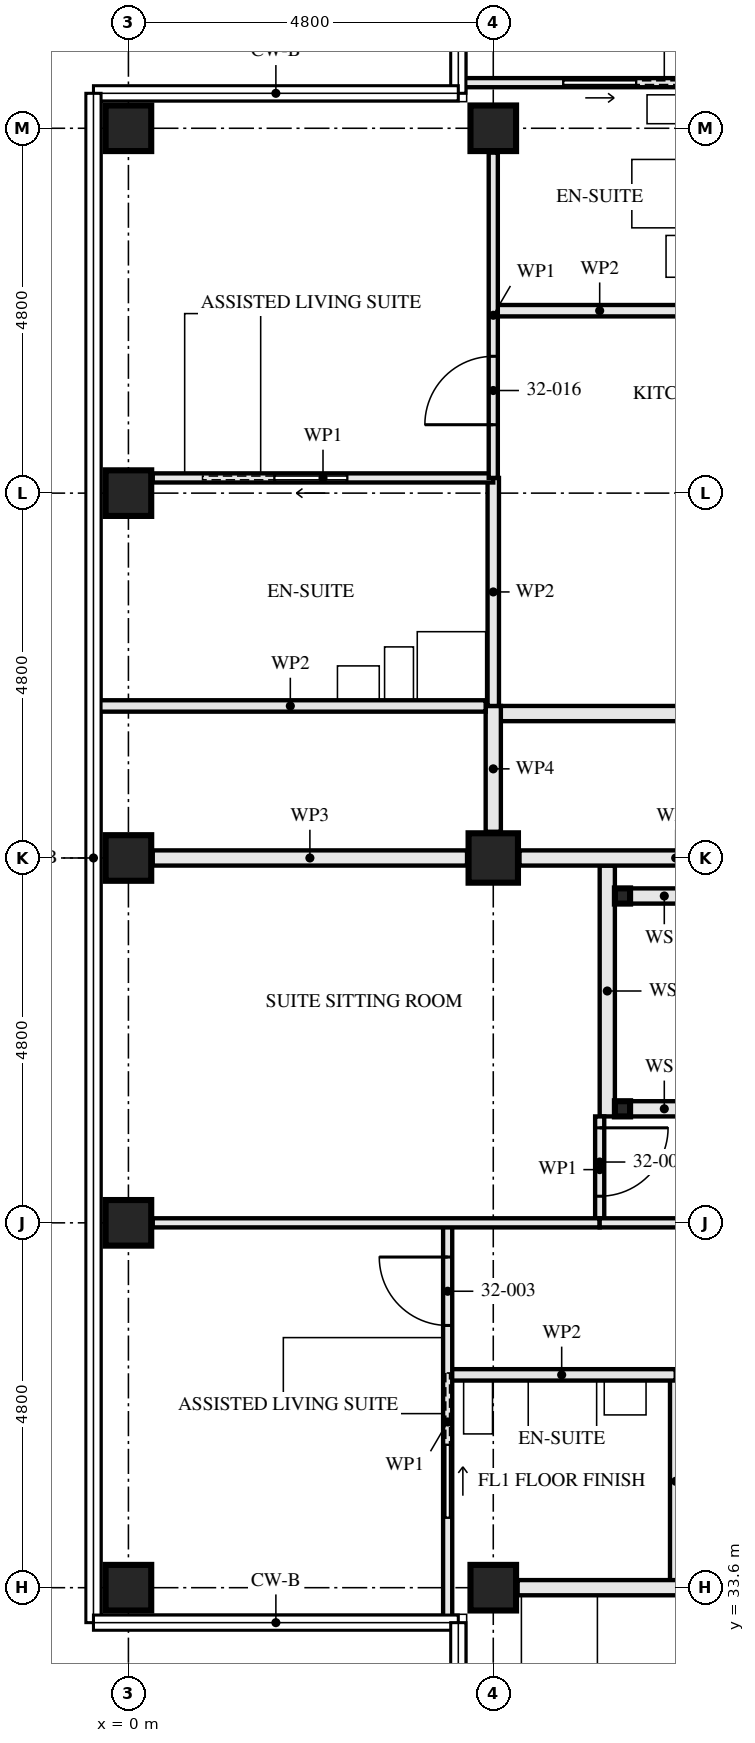
"""IFC4 building model, lengths in metres.
Left out: names, types, materials, properties, quantities, classifications, styles, units other than length and angle.
Written with IfcOpenShell. Run it as: python <this file> out.ifc"""

import sys

from ifc_helpers import new_model, si_unit, direction, frame, frame_2d, origin, origin_2d, place, context, subcontext, project, spatial, rectangle, hollow_rectangle, extrude, element, fill, save


model = new_model("IFC4")
c1 = context("Model", 3, precision=1e-05, world=origin(), true_north=direction((0.0, 1.0)))
c2 = subcontext(c1, "Body", "Model", "MODEL_VIEW")
j1 = project(units=[si_unit("LENGTHUNIT", "METRE"), si_unit("PLANEANGLEUNIT", "RADIAN")], contexts=[c1])
p1 = place(None, origin())
s1 = spatial("IfcSite", under=j1, at=p1, CompositionType="ELEMENT")
p2 = place(p1, origin())
s2 = spatial("IfcBuilding", under=s1, at=p2, CompositionType="ELEMENT")
p3 = place(p2, frame((0.0, 0.0, 119.0)))
s3 = spatial("IfcBuildingStorey", under=s2, at=p3, CompositionType="ELEMENT", Elevation=119.0)
for number, where, z_axis, x_axis in (
    (1, (0.0, 33.6, 0.0), (0.0, 0.0, 1.0), (0.0, 1.0, 0.0)),
    (2, (0.0, 38.4, 0.0), (0.0, 0.0, 1.0), (1.0, 0.0, 0.0)),
    (3, (0.0, 43.2, 0.0), (0.0, 0.0, 1.0), (0.0, 1.0, 0.0)),
    (4, (0.0, 48.0, 0.0), (0.0, 0.0, 1.0), (1.0, 0.0, 0.0)),
    (5, (0.0, 52.8, 0.0), (0.0, 0.0, 1.0), (0.0, 1.0, 0.0)),
    (6, (4.8, 33.6, 0.0), (0.0, 0.0, 1.0), (0.0, 1.0, 0.0)),
):
    element("IfcColumn", number, at=place(p3, frame(where, z_axis=z_axis, x_axis=x_axis)), inside=s3, PredefinedType="COLUMN", context=c2, shape_type="SweptSolid", body=[
        extrude(hollow_rectangle(XDim=0.6, YDim=0.6, WallThickness=0.08, at=origin_2d()), origin(), (0.0, 0.0, 1.0), 3.5),
    ])
p4 = place(p3, frame((4.8, 43.2, 0.0), z_axis=(0.0, 0.0, 1.0), x_axis=(0.0, 1.0, 0.0)))
e7 = element("IfcColumn", 7, at=p4, inside=s3, PredefinedType="COLUMN", context=c2, shape_type="SweptSolid", body=[
    extrude(hollow_rectangle(XDim=0.65, YDim=0.65, WallThickness=0.05, at=origin_2d()), origin(), (0.0, 0.0, 1.0), 3.5),
])
p5 = place(p3, frame((4.8, 52.8, 0.0), z_axis=(0.0, 0.0, 1.0), x_axis=(0.0, 1.0, 0.0)))
e8 = element("IfcColumn", 8, at=p5, inside=s3, PredefinedType="COLUMN", context=c2, shape_type="SweptSolid", body=[
    extrude(hollow_rectangle(XDim=0.6, YDim=0.6, WallThickness=0.08, at=origin_2d()), origin(), (0.0, 0.0, 1.0), 3.5),
])
for number, where, z_axis, x_axis in (
    (9, (6.5, 42.7, 0.0), (0.0, 0.0, 1.0), (1.0, 0.0, 0.0)),
    (10, (6.5, 39.9, 0.0), (0.0, 0.0, 1.0), (1.0, 0.0, 0.0)),
):
    element("IfcColumn", number, at=place(p3, frame(where, z_axis=z_axis, x_axis=x_axis)), inside=s3, PredefinedType="COLUMN", context=c2, shape_type="SweptSolid", body=[
        extrude(hollow_rectangle(XDim=0.2, YDim=0.2, WallThickness=0.008, at=origin_2d()), origin(), (0.0, 0.0, 1.0), 3.33),
    ])
for number, where, z_axis, x_axis in (
    (11, (6.6, 42.7, 0.0), (0.0, 0.0, 1.0), (1.0, 0.0, 0.0)),
    (12, (6.6, 39.9, 0.0), (0.0, 0.0, 1.0), (1.0, 0.0, 0.0)),
):
    element("IfcWall", number, at=place(p3, frame(where, z_axis=z_axis, x_axis=x_axis)), inside=s3, PredefinedType="SOLIDWALL", context=c2, shape_type="SweptSolid", body=[
        extrude(rectangle(XDim=0.9, YDim=0.2, at=frame_2d((0.45, 0.0))), origin(), (0.0, 0.0, 1.0), 2.99),
    ])
p6 = place(p3, frame((6.3, 43.1, 0.0), z_axis=(0.0, 0.0, 1.0), x_axis=(0.0, -1.0, 0.0)))
e13 = element("IfcWall", 13, at=p6, inside=s3, PredefinedType="SOLIDWALL", context=c2, shape_type="SweptSolid", body=[
    extrude(rectangle(XDim=3.3, YDim=0.2, at=frame_2d((1.65, 0.0))), origin(), (0.0, 0.0, 1.0), 3.33),
])
p7 = place(p3, frame((4.2, 36.4, 0.0), z_axis=(0.0, 0.0, 1.0), x_axis=(1.0, 0.0, 0.0)))
e14 = element("IfcWall", 14, at=p7, inside=s3, PredefinedType="PARTITIONING", context=c2, shape_type="SweptSolid", body=[
    extrude(rectangle(XDim=3.0, YDim=0.15, at=frame_2d((1.5, 0.0))), origin(), (0.0, 0.0, 1.0), 3.33),
])
p8 = place(p3, frame((7.2, 36.4, 0.0), z_axis=(0.0, 0.0, 1.0), x_axis=(0.0, -1.0, 0.0)))
e15 = element("IfcWall", 15, at=p8, inside=s3, PredefinedType="PARTITIONING", context=c2, shape_type="SweptSolid", body=[
    extrude(rectangle(XDim=2.8, YDim=0.15, at=frame_2d((1.4, 0.0))), origin(), (0.0, 0.0, 1.0), 3.33),
])
p9 = place(p3, frame((6.2, 38.4, 0.0), z_axis=(0.0, 0.0, 1.0), x_axis=(1.0, 0.0, 0.0)))
e16 = element("IfcWall", 16, at=p9, inside=s3, PredefinedType="PARTITIONING", context=c2, shape_type="SweptSolid", body=[
    extrude(rectangle(XDim=6.25, YDim=0.12, at=frame_2d((3.125, 0.0))), origin(), (0.0, 0.0, 1.0), 2.55),
])
p10 = place(p9, frame((2.675, 0.0, 0.0)))
e17 = element("IfcOpeningElement", 17, at=p10, cuts=e16, PredefinedType="OPENING", context=c2, shape_type="SweptSolid", body=[
    extrude(rectangle(XDim=0.9, YDim=2.1, at=frame_2d((0.45, 1.05))), frame((0.0, 0.071, 0.0), z_axis=(0.0, -1.0, 0.0), x_axis=(1.0, 0.0, 0.0)), (0.0, 0.0, 1.0), 0.141),
])
p11 = place(p3, frame((6.2, 39.8, 0.0), z_axis=(0.0, 0.0, 1.0), x_axis=(0.0, -1.0, 0.0)))
e18 = element("IfcWall", 18, at=p11, inside=s3, PredefinedType="PARTITIONING", context=c2, shape_type="SweptSolid", body=[
    extrude(rectangle(XDim=1.4, YDim=0.12, at=frame_2d((0.7, 0.0))), origin(), (0.0, 0.0, 1.0), 3.33),
])
p12 = place(p11, frame((0.15, 0.0, 0.0)))
e19 = element("IfcOpeningElement", 19, at=p12, cuts=e18, PredefinedType="OPENING", context=c2, shape_type="SweptSolid", body=[
    extrude(rectangle(XDim=0.9, YDim=2.1, at=frame_2d((0.45, 1.05))), frame((0.0, 0.071, 0.0), z_axis=(0.0, -1.0, 0.0), x_axis=(1.0, 0.0, 0.0)), (0.0, 0.0, 1.0), 0.141),
])
p13 = place(p3, frame((4.2, 38.4, 0.0), z_axis=(0.0, 0.0, 1.0), x_axis=(0.0, -1.0, 0.0)))
e20 = element("IfcWall", 20, at=p13, inside=s3, PredefinedType="PARTITIONING", context=c2, shape_type="SweptSolid", body=[
    extrude(rectangle(XDim=5.24, YDim=0.12, at=frame_2d((2.62, 0.0))), origin(), (0.0, 0.0, 1.0), 2.32),
])
p14 = place(p13, frame((0.45, 0.0, 0.0)))
e21 = element("IfcOpeningElement", 21, at=p14, cuts=e20, PredefinedType="OPENING", context=c2, shape_type="SweptSolid", body=[
    extrude(rectangle(XDim=0.9, YDim=2.1, at=frame_2d((0.45, 1.05))), frame((0.0, 0.071, 0.0), z_axis=(0.0, -1.0, 0.0), x_axis=(1.0, 0.0, 0.0)), (0.0, 0.0, 1.0), 0.141),
])
p15 = place(p13, frame((2.925, 0.0, 0.0)))
e22 = element("IfcOpeningElement", 22, at=p15, cuts=e20, PredefinedType="OPENING", context=c2, shape_type="SweptSolid", body=[
    extrude(rectangle(XDim=0.95, YDim=2.1, at=frame_2d((0.475, 1.05))), frame((0.0, 0.071, 0.0), z_axis=(0.0, -1.0, 0.0), x_axis=(1.0, 0.0, 0.0)), (0.0, 0.0, 1.0), 0.141),
])
p16 = place(p3, frame((0.32, 38.4, 0.0), z_axis=(0.0, 0.0, 1.0), x_axis=(1.0, 0.0, 0.0)))
e23 = element("IfcWall", 23, at=p16, inside=s3, PredefinedType="PARTITIONING", context=c2, shape_type="SweptSolid", body=[
    extrude(rectangle(XDim=5.88, YDim=0.12, at=frame_2d((2.94, 0.0))), origin(), (0.0, 0.0, 1.0), 2.55),
])
p17 = place(p3, frame((5.12, 33.6, 0.0), z_axis=(0.0, 0.0, 1.0), x_axis=(1.0, 0.0, 0.0)))
e24 = element("IfcWall", 24, at=p17, inside=s3, PredefinedType="PARTITIONING", context=c2, shape_type="SweptSolid", body=[
    extrude(rectangle(XDim=7.28, YDim=0.2, at=frame_2d((3.64, 0.0))), origin(), (0.0, 0.0, 1.0), 2.55),
])
p18 = place(p3, frame((7.6, 50.4, 0.0), z_axis=(0.0, 0.0, 1.0), x_axis=(-1.0, 0.0, 0.0)))
e25 = element("IfcWall", 25, at=p18, inside=s3, PredefinedType="PARTITIONING", context=c2, shape_type="SweptSolid", body=[
    extrude(rectangle(XDim=2.8, YDim=0.15, at=frame_2d((1.4, 0.0))), origin(), (0.0, 0.0, 1.0), 3.33),
])
p19 = place(p3, frame((4.8, 48.2, 0.0), z_axis=(0.0, 0.0, 1.0), x_axis=(0.0, -1.0, 0.0)))
e26 = element("IfcWall", 26, at=p19, inside=s3, PredefinedType="PARTITIONING", context=c2, shape_type="SweptSolid", body=[
    extrude(rectangle(XDim=3.0, YDim=0.15, at=frame_2d((1.5, 0.0))), origin(), (0.0, 0.0, 1.0), 2.55),
])
p20 = place(p3, frame((9.6, 53.4, 0.0), z_axis=(0.0, 0.0, 1.0), x_axis=(-1.0, 0.0, 0.0)))
e27 = element("IfcWall", 27, at=p20, inside=s3, PredefinedType="PARTITIONING", context=c2, shape_type="SweptSolid", body=[
    extrude(rectangle(XDim=5.24, YDim=0.12, at=frame_2d((2.62, 0.0))), origin(), (0.0, 0.0, 1.0), 2.32),
])
p21 = place(p20, frame((0.45, 0.0, 0.0)))
e28 = element("IfcOpeningElement", 28, at=p21, cuts=e27, PredefinedType="OPENING", context=c2, shape_type="SweptSolid", body=[
    extrude(rectangle(XDim=0.9, YDim=2.1, at=frame_2d((0.45, 1.05))), frame((0.0, 0.071, 0.0), z_axis=(0.0, -1.0, 0.0), x_axis=(1.0, 0.0, 0.0)), (0.0, 0.0, 1.0), 0.141),
])
p22 = place(p20, frame((2.925, 0.0, 0.0)))
e29 = element("IfcOpeningElement", 29, at=p22, cuts=e27, PredefinedType="OPENING", context=c2, shape_type="SweptSolid", body=[
    extrude(rectangle(XDim=0.95, YDim=2.1, at=frame_2d((0.475, 1.05))), frame((0.0, 0.071, 0.0), z_axis=(0.0, -1.0, 0.0), x_axis=(1.0, 0.0, 0.0)), (0.0, 0.0, 1.0), 0.141),
])
p23 = place(p3, frame((4.8, 48.2, 0.0), z_axis=(0.0, 0.0, 1.0), x_axis=(-1.0, 0.0, 0.0)))
e30 = element("IfcWall", 30, at=p23, inside=s3, PredefinedType="PARTITIONING", context=c2, shape_type="SweptSolid", body=[
    extrude(rectangle(XDim=4.48, YDim=0.12, at=frame_2d((2.24, 0.0))), origin(), (0.0, 0.0, 1.0), 3.33),
])
p24 = place(p23, frame((1.925, 0.0, 0.0)))
e31 = element("IfcOpeningElement", 31, at=p24, cuts=e30, PredefinedType="OPENING", context=c2, shape_type="SweptSolid", body=[
    extrude(rectangle(XDim=0.95, YDim=2.1, at=frame_2d((0.475, 1.05))), frame((0.0, 0.071, 0.0), z_axis=(0.0, -1.0, 0.0), x_axis=(1.0, 0.0, 0.0)), (0.0, 0.0, 1.0), 0.141),
])
p25 = place(p3, frame((4.8, 52.48, 0.0), z_axis=(0.0, 0.0, 1.0), x_axis=(0.0, -1.0, 0.0)))
e32 = element("IfcWall", 32, at=p25, inside=s3, PredefinedType="PARTITIONING", context=c2, shape_type="SweptSolid", body=[
    extrude(rectangle(XDim=4.28, YDim=0.12, at=frame_2d((2.14, 0.0))), origin(), (0.0, 0.0, 1.0), 3.33),
])
p26 = place(p25, frame((2.68, 0.0, 0.0)))
e33 = element("IfcOpeningElement", 33, at=p26, cuts=e32, PredefinedType="OPENING", context=c2, shape_type="SweptSolid", body=[
    extrude(rectangle(XDim=0.9, YDim=2.1, at=frame_2d((0.45, 1.05))), frame((0.0, 0.071, 0.0), z_axis=(0.0, -1.0, 0.0), x_axis=(1.0, 0.0, 0.0)), (0.0, 0.0, 1.0), 0.141),
])
p27 = place(p3, frame((14.4, 45.1, 0.0), z_axis=(0.0, 0.0, 1.0), x_axis=(-1.0, 0.0, 0.0)))
e34 = element("IfcWall", 34, at=p27, inside=s3, PredefinedType="PARTITIONING", context=c2, shape_type="SweptSolid", body=[
    extrude(rectangle(XDim=9.6, YDim=0.2, at=frame_2d((4.8, 0.0))), origin(), (0.0, 0.0, 1.0), 3.33),
])
p28 = place(p27, frame((0.4, 0.0, 0.0)))
e35 = element("IfcOpeningElement", 35, at=p28, cuts=e34, PredefinedType="OPENING", context=c2, shape_type="SweptSolid", body=[
    extrude(rectangle(XDim=1.0, YDim=2.1, at=frame_2d((0.5, 1.05))), frame((0.0, 0.111, 0.0), z_axis=(0.0, -1.0, 0.0), x_axis=(1.0, 0.0, 0.0)), (0.0, 0.0, 1.0), 0.221),
])
p29 = place(p27, frame((5.2, 0.0, 0.0)))
e36 = element("IfcOpeningElement", 36, at=p29, cuts=e34, PredefinedType="OPENING", context=c2, shape_type="SweptSolid", body=[
    extrude(rectangle(XDim=1.0, YDim=2.1, at=frame_2d((0.5, 1.05))), frame((0.0, 0.111, 0.0), z_axis=(0.0, -1.0, 0.0), x_axis=(1.0, 0.0, 0.0)), (0.0, 0.0, 1.0), 0.221),
])
p30 = place(p3, frame((4.8, 45.2, 0.0), z_axis=(0.0, 0.0, 1.0), x_axis=(0.0, -1.0, 0.0)))
e37 = element("IfcWall", 37, at=p30, inside=s3, PredefinedType="PARTITIONING", context=c2, shape_type="SweptSolid", body=[
    extrude(rectangle(XDim=1.655, YDim=0.2, at=frame_2d((0.828, 0.0))), origin(), (0.0, 0.0, 1.0), 3.33),
])
p31 = place(p3, frame((9.255, 43.2, 0.0), z_axis=(0.0, 0.0, 1.0), x_axis=(-1.0, 0.0, 0.0)))
e38 = element("IfcWall", 38, at=p31, inside=s3, PredefinedType="PARTITIONING", context=c2, shape_type="SweptSolid", body=[
    extrude(rectangle(XDim=4.11, YDim=0.2, at=frame_2d((2.055, 0.0))), origin(), (0.0, 0.0, 1.0), 2.32),
])
p32 = place(p3, frame((4.455, 43.2, 0.0), z_axis=(0.0, 0.0, 1.0), x_axis=(-1.0, 0.0, 0.0)))
e39 = element("IfcWall", 39, at=p32, inside=s3, PredefinedType="PARTITIONING", context=c2, shape_type="SweptSolid", body=[
    extrude(rectangle(XDim=4.135, YDim=0.2, at=frame_2d((2.067, 0.0))), origin(), (0.0, 0.0, 1.0), 2.32),
])
p33 = place(p3, frame((4.7, 45.2, 0.0), z_axis=(0.0, 0.0, 1.0), x_axis=(-1.0, 0.0, 0.0)))
e40 = element("IfcWall", 40, at=p33, inside=s3, PredefinedType="PARTITIONING", context=c2, shape_type="SweptSolid", body=[
    extrude(rectangle(XDim=5.14, YDim=0.15, at=frame_2d((2.57, 0.0))), origin(), (0.0, 0.0, 1.0), 2.32),
])
p34 = place(p12, origin())
e41 = element("IfcDoor", 41, at=p34, inside=s3, OperationType="SINGLE_SWING_RIGHT", PredefinedType="DOOR", context=c2, shape_type="SweptSolid", body=[
    extrude(rectangle(XDim=0.9, YDim=2.1, at=frame_2d((0.45, 1.05))), frame((0.0, 0.022, 0.0), z_axis=(0.0, -1.0, 0.0), x_axis=(1.0, 0.0, 0.0)), (0.0, 0.0, 1.0), 0.044),
])
fill(e19, e41)
p35 = place(p14, frame((0.9, 0.0, 0.0), z_axis=(0.0, 0.0, 1.0), x_axis=(-1.0, 0.0, 0.0)))
e42 = element("IfcDoor", 42, at=p35, inside=s3, OperationType="SINGLE_SWING_LEFT", PredefinedType="DOOR", context=c2, shape_type="SweptSolid", body=[
    extrude(rectangle(XDim=0.9, YDim=2.1, at=frame_2d((0.45, 1.05))), frame((0.0, 0.022, 0.0), z_axis=(0.0, -1.0, 0.0), x_axis=(1.0, 0.0, 0.0)), (0.0, 0.0, 1.0), 0.044),
])
fill(e21, e42)
p36 = place(p15, origin())
e43 = element("IfcDoor", 43, at=p36, inside=s3, OperationType="SLIDING_TO_RIGHT", PredefinedType="DOOR", context=c2, shape_type="SweptSolid", body=[
    extrude(rectangle(XDim=0.95, YDim=2.1, at=frame_2d((0.475, 1.05))), frame((0.0, 0.022, 0.0), z_axis=(0.0, -1.0, 0.0), x_axis=(1.0, 0.0, 0.0)), (0.0, 0.0, 1.0), 0.044),
])
fill(e22, e43)
p37 = place(p22, origin())
e44 = element("IfcDoor", 44, at=p37, inside=s3, OperationType="SLIDING_TO_RIGHT", PredefinedType="DOOR", context=c2, shape_type="SweptSolid", body=[
    extrude(rectangle(XDim=0.95, YDim=2.1, at=frame_2d((0.475, 1.05))), frame((0.0, 0.022, 0.0), z_axis=(0.0, -1.0, 0.0), x_axis=(1.0, 0.0, 0.0)), (0.0, 0.0, 1.0), 0.044),
])
fill(e29, e44)
p38 = place(p24, origin())
e45 = element("IfcDoor", 45, at=p38, inside=s3, OperationType="SLIDING_TO_LEFT", PredefinedType="DOOR", context=c2, shape_type="SweptSolid", body=[
    extrude(rectangle(XDim=0.95, YDim=2.1, at=frame_2d((0.475, 1.05))), frame((0.0, 0.022, 0.0), z_axis=(0.0, -1.0, 0.0), x_axis=(1.0, 0.0, 0.0)), (0.0, 0.0, 1.0), 0.044),
])
fill(e31, e45)
p39 = place(p26, frame((0.9, 0.0, 0.0), z_axis=(0.0, 0.0, 1.0), x_axis=(-1.0, 0.0, 0.0)))
e46 = element("IfcDoor", 46, at=p39, inside=s3, OperationType="SINGLE_SWING_RIGHT", PredefinedType="DOOR", context=c2, shape_type="SweptSolid", body=[
    extrude(rectangle(XDim=0.9, YDim=2.1, at=frame_2d((0.45, 1.05))), frame((0.0, 0.022, 0.0), z_axis=(0.0, -1.0, 0.0), x_axis=(1.0, 0.0, 0.0)), (0.0, 0.0, 1.0), 0.044),
])
fill(e33, e46)
save(model, sys.argv[1])
